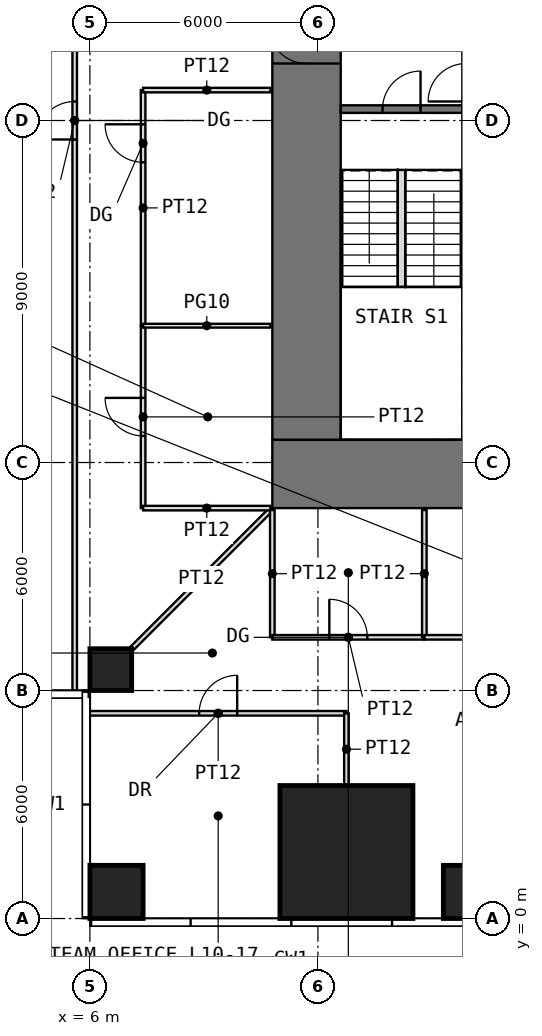
"""IFC4 building model, lengths in metres.
Left out: names, types, materials, properties, quantities, classifications, styles, units other than length and angle.
Written with IfcOpenShell. Run it as: python <this file> out.ifc"""

import sys

from ifc_helpers import new_model, si_unit, direction, frame, frame_2d, origin, origin_2d, place, context, subcontext, project, spatial, rectangle, extrude, element, fill, save


model = new_model("IFC4")
c1 = context("Model", 3, precision=1e-05, world=origin(), true_north=direction((0.0, 1.0)))
c2 = subcontext(c1, "Body", "Model", "MODEL_VIEW")
j1 = project(units=[si_unit("LENGTHUNIT", "METRE"), si_unit("PLANEANGLEUNIT", "RADIAN")], contexts=[c1])
p1 = place(None, origin())
s1 = spatial("IfcSite", under=j1, at=p1, CompositionType="ELEMENT")
p2 = place(p1, origin())
s2 = spatial("IfcBuilding", under=s1, at=p2, CompositionType="ELEMENT")
p3 = place(p2, frame((0.0, 0.0, 46.5)))
s3 = spatial("IfcBuildingStorey", under=s2, at=p3, CompositionType="ELEMENT", Elevation=46.5)
p4 = place(p3, frame((6.7, 0.7, 0.0), z_axis=(0.0, 0.0, 1.0), x_axis=(1.0, 0.0, 0.0)))
e1 = element("IfcColumn", 1, at=p4, inside=s3, PredefinedType="COLUMN", context=c2, shape_type="SweptSolid", body=[
    extrude(rectangle(XDim=1.4, YDim=1.4, at=origin_2d()), origin(), (0.0, 0.0, 1.0), 4.0),
])
p5 = place(p3, frame((12.75, 1.75, 0.0), z_axis=(0.0, 0.0, 1.0), x_axis=(1.0, 0.0, 0.0)))
e2 = element("IfcColumn", 2, at=p5, inside=s3, PredefinedType="COLUMN", context=c2, shape_type="SweptSolid", body=[
    extrude(rectangle(XDim=3.5, YDim=3.5, at=origin_2d()), origin(), (0.0, 0.0, 1.0), 4.0),
])
p6 = place(p3, frame((16.0, 0.7, 0.0), z_axis=(0.0, 0.0, 1.0), x_axis=(1.0, 0.0, 0.0)))
e3 = element("IfcColumn", 3, at=p6, inside=s3, PredefinedType="COLUMN", context=c2, shape_type="SweptSolid", body=[
    extrude(rectangle(XDim=1.4, YDim=1.4, at=origin_2d()), origin(), (0.0, 0.0, 1.0), 4.0),
])
p7 = place(p3, frame((6.55, 6.55, 0.0), z_axis=(0.0, 0.0, 1.0), x_axis=(1.0, 0.0, 0.0)))
e4 = element("IfcColumn", 4, at=p7, inside=s3, PredefinedType="COLUMN", context=c2, shape_type="SweptSolid", body=[
    extrude(rectangle(XDim=1.1, YDim=1.1, at=origin_2d()), origin(), (0.0, 0.0, 1.0), 4.0),
])
p8 = place(p3, frame((10.8, 11.7, -0.05), z_axis=(0.0, 0.0, 1.0), x_axis=(1.0, 0.0, 0.0)))
e5 = element("IfcWall", 5, at=p8, inside=s3, PredefinedType="SHEAR", context=c2, shape_type="SweptSolid", body=[
    extrude(rectangle(XDim=20.4, YDim=1.8, at=frame_2d((10.2, 0.0))), origin(), (0.0, 0.0, 1.0), 4.0),
])
p9 = place(p8, frame((9.2, 0.0, 0.05)))
e6 = element("IfcOpeningElement", 6, at=p9, cuts=e5, PredefinedType="OPENING", context=c2, shape_type="SweptSolid", body=[
    extrude(rectangle(XDim=2.0, YDim=2.2, at=frame_2d((1.0, 1.1))), frame((0.0, 0.91, 0.0), z_axis=(0.0, -1.0, 0.0), x_axis=(1.0, 0.0, 0.0)), (0.0, 0.0, 1.0), 1.82),
])
p10 = place(p3, frame((11.7, 12.6, -0.05), z_axis=(0.0, 0.0, 1.0), x_axis=(0.0, 1.0, 0.0)))
e7 = element("IfcWall", 7, at=p10, inside=s3, PredefinedType="SHEAR", context=c2, shape_type="SweptSolid", body=[
    extrude(rectangle(XDim=16.8, YDim=1.8, at=frame_2d((8.4, 0.0))), origin(), (0.0, 0.0, 1.0), 4.0),
])
p11 = place(p10, frame((9.9, 0.0, 0.05)))
e8 = element("IfcOpeningElement", 8, at=p11, cuts=e7, PredefinedType="OPENING", context=c2, shape_type="SweptSolid", body=[
    extrude(rectangle(XDim=1.0, YDim=2.2, at=frame_2d((0.5, 1.1))), frame((0.0, 0.91, 0.0), z_axis=(0.0, -1.0, 0.0), x_axis=(1.0, 0.0, 0.0)), (0.0, 0.0, 1.0), 1.82),
])
p12 = place(p3, frame((15.9, 12.6, -0.05), z_axis=(0.0, 0.0, 1.0), x_axis=(0.0, 1.0, 0.0)))
e9 = element("IfcWall", 9, at=p12, inside=s3, PredefinedType="SHEAR", context=c2, shape_type="SweptSolid", body=[
    extrude(rectangle(XDim=16.8, YDim=0.2, at=frame_2d((8.4, 0.0))), origin(), (0.0, 0.0, 1.0), 4.0),
])
p13 = place(p12, frame((8.9, 0.0, 0.05)))
e10 = element("IfcOpeningElement", 10, at=p13, cuts=e9, PredefinedType="OPENING", context=c2, shape_type="SweptSolid", body=[
    extrude(rectangle(XDim=1.0, YDim=2.2, at=frame_2d((0.5, 1.1))), frame((0.0, 0.11, 0.0), z_axis=(0.0, -1.0, 0.0), x_axis=(1.0, 0.0, 0.0)), (0.0, 0.0, 1.0), 0.22),
])
p14 = place(p3, frame((12.6, 21.3, -0.05), z_axis=(0.0, 0.0, 1.0), x_axis=(1.0, 0.0, 0.0)))
e11 = element("IfcWall", 11, at=p14, inside=s3, PredefinedType="SHEAR", context=c2, shape_type="SweptSolid", body=[
    extrude(rectangle(XDim=3.2, YDim=0.2, at=frame_2d((1.6, 0.0))), origin(), (0.0, 0.0, 1.0), 4.0),
])
p15 = place(p14, frame((1.1, 0.0, 0.05)))
e12 = element("IfcOpeningElement", 12, at=p15, cuts=e11, PredefinedType="OPENING", context=c2, shape_type="SweptSolid", body=[
    extrude(rectangle(XDim=1.0, YDim=2.2, at=frame_2d((0.5, 1.1))), frame((0.0, 0.11, 0.0), z_axis=(0.0, -1.0, 0.0), x_axis=(1.0, 0.0, 0.0)), (0.0, 0.0, 1.0), 0.22),
])
p16 = place(p3, frame((5.6, 6.0, 0.0), z_axis=(0.0, 0.0, 1.0), x_axis=(0.0, 1.0, 0.0)))
e13 = element("IfcWall", 13, at=p16, inside=s3, PredefinedType="PARTITIONING", context=c2, shape_type="SweptSolid", body=[
    extrude(rectangle(XDim=30.0, YDim=0.12, at=frame_2d((15.0, 0.0))), origin(), (0.0, 0.0, 1.0), 3.75),
])
p17 = place(p16, frame((14.5, 0.0, 0.0)))
e14 = element("IfcOpeningElement", 14, at=p17, cuts=e13, PredefinedType="OPENING", context=c2, shape_type="SweptSolid", body=[
    extrude(rectangle(XDim=1.0, YDim=2.4, at=frame_2d((0.5, 1.2))), frame((0.0, 0.07, 0.0), z_axis=(0.0, -1.0, 0.0), x_axis=(1.0, 0.0, 0.0)), (0.0, 0.0, 1.0), 0.14),
])
p18 = place(p3, frame((6.0, 5.4, 0.0), z_axis=(0.0, 0.0, 1.0), x_axis=(1.0, 0.0, 0.0)))
e15 = element("IfcWall", 15, at=p18, inside=s3, PredefinedType="PARTITIONING", context=c2, shape_type="SweptSolid", body=[
    extrude(rectangle(XDim=6.75, YDim=0.12, at=frame_2d((3.375, 0.0))), origin(), (0.0, 0.0, 1.0), 3.75),
])
p19 = place(p18, frame((2.875, 0.0, 0.0)))
e16 = element("IfcOpeningElement", 16, at=p19, cuts=e15, PredefinedType="OPENING", context=c2, shape_type="SweptSolid", body=[
    extrude(rectangle(XDim=1.0, YDim=2.2, at=frame_2d((0.5, 1.1))), frame((0.0, 0.07, 0.0), z_axis=(0.0, -1.0, 0.0), x_axis=(1.0, 0.0, 0.0)), (0.0, 0.0, 1.0), 0.14),
])
p20 = place(p3, frame((7.11, 7.11, 0.0), z_axis=(0.0, 0.0, 1.0), x_axis=(0.707106781187, 0.707106781187, 0.0)))
e17 = element("IfcWall", 17, at=p20, inside=s3, PredefinedType="PARTITIONING", context=c2, shape_type="SweptSolid", body=[
    extrude(rectangle(XDim=5.168, YDim=0.12, at=frame_2d((2.584, 0.0))), origin(), (0.0, 0.0, 1.0), 3.75),
])
p21 = place(p3, frame((7.4, 10.8, 0.0), z_axis=(0.0, 0.0, 1.0), x_axis=(0.0, 1.0, 0.0)))
e18 = element("IfcWall", 18, at=p21, inside=s3, PredefinedType="PARTITIONING", context=c2, shape_type="SweptSolid", body=[
    extrude(rectangle(XDim=4.8, YDim=0.12, at=frame_2d((2.4, 0.0))), origin(), (0.0, 0.0, 1.0), 3.75),
])
p22 = place(p21, frame((1.9, 0.0, 0.0)))
e19 = element("IfcOpeningElement", 19, at=p22, cuts=e18, PredefinedType="OPENING", context=c2, shape_type="SweptSolid", body=[
    extrude(rectangle(XDim=1.0, YDim=2.4, at=frame_2d((0.5, 1.2))), frame((0.0, 0.07, 0.0), z_axis=(0.0, -1.0, 0.0), x_axis=(1.0, 0.0, 0.0)), (0.0, 0.0, 1.0), 0.14),
])
p23 = place(p3, frame((7.4, 10.8, 0.0), z_axis=(0.0, 0.0, 1.0), x_axis=(1.0, 0.0, 0.0)))
e20 = element("IfcWall", 20, at=p23, inside=s3, PredefinedType="PARTITIONING", context=c2, shape_type="SweptSolid", body=[
    extrude(rectangle(XDim=3.35, YDim=0.12, at=frame_2d((1.675, 0.0))), origin(), (0.0, 0.0, 1.0), 3.75),
])
p24 = place(p3, frame((7.4, 15.6, 0.0), z_axis=(0.0, 0.0, 1.0), x_axis=(0.0, 1.0, 0.0)))
e21 = element("IfcWall", 21, at=p24, inside=s3, PredefinedType="PARTITIONING", context=c2, shape_type="SweptSolid", body=[
    extrude(rectangle(XDim=6.2, YDim=0.12, at=frame_2d((3.1, 0.0))), origin(), (0.0, 0.0, 1.0), 3.75),
])
p25 = place(p24, frame((4.3, 0.0, 0.0)))
e22 = element("IfcOpeningElement", 22, at=p25, cuts=e21, PredefinedType="OPENING", context=c2, shape_type="SweptSolid", body=[
    extrude(rectangle(XDim=1.0, YDim=2.4, at=frame_2d((0.5, 1.2))), frame((0.0, 0.07, 0.0), z_axis=(0.0, -1.0, 0.0), x_axis=(1.0, 0.0, 0.0)), (0.0, 0.0, 1.0), 0.14),
])
p26 = place(p3, frame((7.4, 15.6, 0.0), z_axis=(0.0, 0.0, 1.0), x_axis=(1.0, 0.0, 0.0)))
e23 = element("IfcWall", 23, at=p26, inside=s3, PredefinedType="PARTITIONING", context=c2, shape_type="SweptSolid", body=[
    extrude(rectangle(XDim=3.35, YDim=0.1, at=frame_2d((1.675, 0.0))), origin(), (0.0, 0.0, 1.0), 3.75),
])
for number, where, z_axis, x_axis in (
    (24, (7.4, 21.8, 0.0), (0.0, 0.0, 1.0), (1.0, 0.0, 0.0)),
    (25, (10.8, 7.4, 0.0), (0.0, 0.0, 1.0), (0.0, 1.0, 0.0)),
):
    element("IfcWall", number, at=place(p3, frame(where, z_axis=z_axis, x_axis=x_axis)), inside=s3, PredefinedType="PARTITIONING", context=c2, shape_type="SweptSolid", body=[
        extrude(rectangle(XDim=3.35, YDim=0.12, at=frame_2d((1.675, 0.0))), origin(), (0.0, 0.0, 1.0), 3.75),
    ])
p27 = place(p3, frame((10.8, 7.4, 0.0), z_axis=(0.0, 0.0, 1.0), x_axis=(1.0, 0.0, 0.0)))
e26 = element("IfcWall", 26, at=p27, inside=s3, PredefinedType="PARTITIONING", context=c2, shape_type="SweptSolid", body=[
    extrude(rectangle(XDim=4.0, YDim=0.12, at=frame_2d((2.0, 0.0))), origin(), (0.0, 0.0, 1.0), 3.75),
])
p28 = place(p27, frame((1.5, 0.0, 0.0)))
e27 = element("IfcOpeningElement", 27, at=p28, cuts=e26, PredefinedType="OPENING", context=c2, shape_type="SweptSolid", body=[
    extrude(rectangle(XDim=1.0, YDim=2.4, at=frame_2d((0.5, 1.2))), frame((0.0, 0.07, 0.0), z_axis=(0.0, -1.0, 0.0), x_axis=(1.0, 0.0, 0.0)), (0.0, 0.0, 1.0), 0.14),
])
p29 = place(p3, frame((12.75, 3.51, 0.0), z_axis=(0.0, 0.0, 1.0), x_axis=(0.0, 1.0, 0.0)))
e28 = element("IfcWall", 28, at=p29, inside=s3, PredefinedType="PARTITIONING", context=c2, shape_type="SweptSolid", body=[
    extrude(rectangle(XDim=1.89, YDim=0.12, at=frame_2d((0.945, 0.0))), origin(), (0.0, 0.0, 1.0), 3.75),
])
p30 = place(p3, frame((14.8, 7.4, 0.0), z_axis=(0.0, 0.0, 1.0), x_axis=(0.0, 1.0, 0.0)))
e29 = element("IfcWall", 29, at=p30, inside=s3, PredefinedType="PARTITIONING", context=c2, shape_type="SweptSolid", body=[
    extrude(rectangle(XDim=3.35, YDim=0.12, at=frame_2d((1.675, 0.0))), origin(), (0.0, 0.0, 1.0), 3.75),
])
p31 = place(p3, frame((14.8, 7.4, 0.0), z_axis=(0.0, 0.0, 1.0), x_axis=(1.0, 0.0, 0.0)))
e30 = element("IfcWall", 30, at=p31, inside=s3, PredefinedType="PARTITIONING", context=c2, shape_type="SweptSolid", body=[
    extrude(rectangle(XDim=3.8, YDim=0.12, at=frame_2d((1.9, 0.0))), origin(), (0.0, 0.0, 1.0), 3.75),
])
p32 = place(p31, frame((1.4, 0.0, 0.0)))
e31 = element("IfcOpeningElement", 31, at=p32, cuts=e30, PredefinedType="OPENING", context=c2, shape_type="SweptSolid", body=[
    extrude(rectangle(XDim=1.0, YDim=2.4, at=frame_2d((0.5, 1.2))), frame((0.0, 0.07, 0.0), z_axis=(0.0, -1.0, 0.0), x_axis=(1.0, 0.0, 0.0)), (0.0, 0.0, 1.0), 0.14),
])
p33 = place(p3, frame((14.2, 16.62, 0.0), z_axis=(0.0, 0.0, 1.0), x_axis=(0.0, 1.0, 0.0)))
e32 = element("IfcWall", 32, at=p33, inside=s3, PredefinedType="PARTITIONING", context=c2, shape_type="SweptSolid", body=[
    extrude(rectangle(XDim=3.08, YDim=0.2, at=frame_2d((1.54, 0.0))), origin(), (0.0, 0.0, 1.0), 4.0),
])
p34 = place(p11, origin())
e33 = element("IfcDoor", 33, at=p34, inside=s3, OperationType="SINGLE_SWING_RIGHT", PredefinedType="DOOR", context=c2, shape_type="SweptSolid", body=[
    extrude(rectangle(XDim=1.0, YDim=2.2, at=frame_2d((0.5, 1.1))), frame((0.0, 0.025, 0.0), z_axis=(0.0, -1.0, 0.0), x_axis=(1.0, 0.0, 0.0)), (0.0, 0.0, 1.0), 0.05),
])
fill(e8, e33)
p35 = place(p15, origin())
e34 = element("IfcDoor", 34, at=p35, inside=s3, OperationType="SINGLE_SWING_RIGHT", PredefinedType="DOOR", context=c2, shape_type="SweptSolid", body=[
    extrude(rectangle(XDim=1.0, YDim=2.2, at=frame_2d((0.5, 1.1))), frame((0.0, 0.025, 0.0), z_axis=(0.0, -1.0, 0.0), x_axis=(1.0, 0.0, 0.0)), (0.0, 0.0, 1.0), 0.05),
])
fill(e12, e34)
p36 = place(p28, origin())
e35 = element("IfcDoor", 35, at=p36, inside=s3, OperationType="SINGLE_SWING_LEFT", PredefinedType="DOOR", context=c2, shape_type="SweptSolid", body=[
    extrude(rectangle(XDim=1.0, YDim=2.4, at=frame_2d((0.5, 1.2))), frame((0.0, 0.025, 0.0), z_axis=(0.0, -1.0, 0.0), x_axis=(1.0, 0.0, 0.0)), (0.0, 0.0, 1.0), 0.05),
])
fill(e27, e35)
p37 = place(p19, origin())
e36 = element("IfcDoor", 36, at=p37, inside=s3, OperationType="SINGLE_SWING_RIGHT", PredefinedType="DOOR", context=c2, shape_type="SweptSolid", body=[
    extrude(rectangle(XDim=1.0, YDim=2.2, at=frame_2d((0.5, 1.1))), frame((0.0, 0.025, 0.0), z_axis=(0.0, -1.0, 0.0), x_axis=(1.0, 0.0, 0.0)), (0.0, 0.0, 1.0), 0.05),
])
fill(e16, e36)
p38 = place(p22, origin())
e37 = element("IfcDoor", 37, at=p38, inside=s3, OperationType="SINGLE_SWING_RIGHT", PredefinedType="DOOR", context=c2, shape_type="SweptSolid", body=[
    extrude(rectangle(XDim=1.0, YDim=2.4, at=frame_2d((0.5, 1.2))), frame((0.0, 0.025, 0.0), z_axis=(0.0, -1.0, 0.0), x_axis=(1.0, 0.0, 0.0)), (0.0, 0.0, 1.0), 0.05),
])
fill(e19, e37)
p39 = place(p17, origin())
e38 = element("IfcDoor", 38, at=p39, inside=s3, OperationType="SINGLE_SWING_LEFT", PredefinedType="DOOR", context=c2, shape_type="SweptSolid", body=[
    extrude(rectangle(XDim=1.0, YDim=2.4, at=frame_2d((0.5, 1.2))), frame((0.0, 0.025, 0.0), z_axis=(0.0, -1.0, 0.0), x_axis=(1.0, 0.0, 0.0)), (0.0, 0.0, 1.0), 0.05),
])
fill(e14, e38)
p40 = place(p25, origin())
e39 = element("IfcDoor", 39, at=p40, inside=s3, OperationType="SINGLE_SWING_RIGHT", PredefinedType="DOOR", context=c2, shape_type="SweptSolid", body=[
    extrude(rectangle(XDim=1.0, YDim=2.4, at=frame_2d((0.5, 1.2))), frame((0.0, 0.025, 0.0), z_axis=(0.0, -1.0, 0.0), x_axis=(1.0, 0.0, 0.0)), (0.0, 0.0, 1.0), 0.05),
])
fill(e22, e39)
save(model, sys.argv[1])
